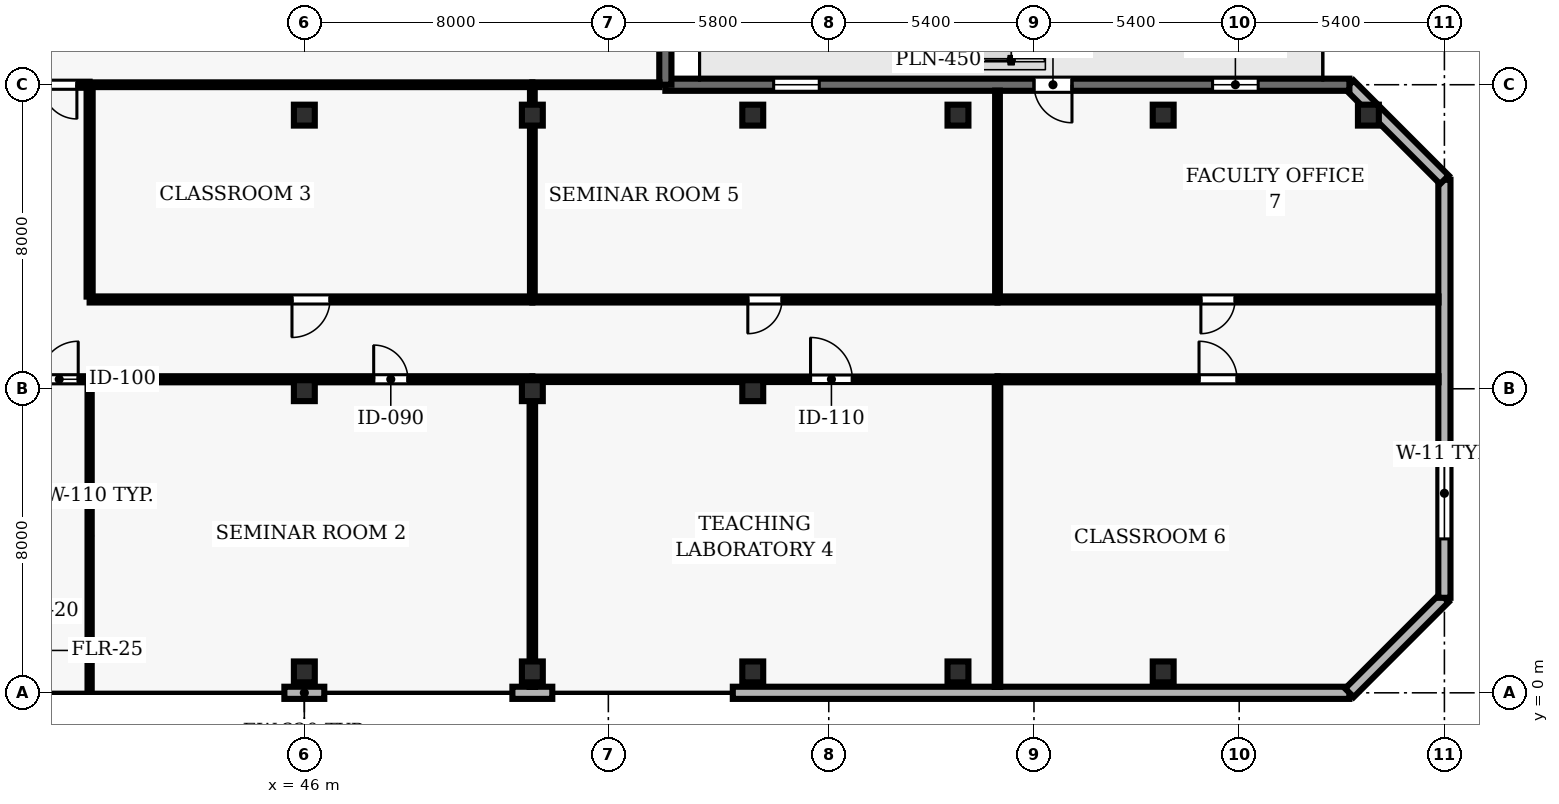
"""IFC4 building model, lengths in metres.
Left out: names, types, materials, properties, quantities, classifications, styles, units other than length and angle.
Written with IfcOpenShell. Run it as: python <this file> out.ifc"""

import sys

from ifc_helpers import new_model, si_unit, direction, frame, frame_2d, origin, origin_2d, place, context, subcontext, project, spatial, rectangle, hollow_rectangle, extrude, element, fill, save


model = new_model("IFC4")
c1 = context("Model", 3, precision=1e-05, world=origin(), true_north=direction((0.0, 1.0)))
c2 = subcontext(c1, "Body", "Model", "MODEL_VIEW")
j1 = project(units=[si_unit("LENGTHUNIT", "METRE"), si_unit("PLANEANGLEUNIT", "RADIAN")], contexts=[c1])
p1 = place(None, origin())
s1 = spatial("IfcSite", under=j1, at=p1, CompositionType="ELEMENT")
p2 = place(p1, origin())
s2 = spatial("IfcBuilding", under=s1, at=p2, CompositionType="ELEMENT")
p3 = place(p2, frame((0.0, 0.0, 38.8)))
s3 = spatial("IfcBuildingStorey", under=s2, at=p3, CompositionType="ELEMENT", Elevation=38.8)
for number, where, z_axis, x_axis in (
    (1, (46.0, 0.55, 0.0), (0.0, 0.0, 1.0), (1.0, 0.0, 0.0)),
    (2, (46.0, 7.95, 0.0), (0.0, 0.0, 1.0), (1.0, 0.0, 0.0)),
    (3, (46.0, 15.2, 0.0), (0.0, 0.0, 1.0), (1.0, 0.0, 0.0)),
    (4, (52.0, 0.55, 0.0), (0.0, 0.0, 1.0), (1.0, 0.0, 0.0)),
    (5, (52.0, 7.95, 0.0), (0.0, 0.0, 1.0), (1.0, 0.0, 0.0)),
    (6, (52.0, 15.2, 0.0), (0.0, 0.0, 1.0), (1.0, 0.0, 0.0)),
    (7, (57.8, 0.55, 0.0), (0.0, 0.0, 1.0), (1.0, 0.0, 0.0)),
    (8, (57.8, 7.95, 0.0), (0.0, 0.0, 1.0), (1.0, 0.0, 0.0)),
    (9, (57.8, 15.2, 0.0), (0.0, 0.0, 1.0), (1.0, 0.0, 0.0)),
    (10, (63.2, 0.55, 0.0), (0.0, 0.0, 1.0), (1.0, 0.0, 0.0)),
    (11, (63.2, 15.2, 0.0), (0.0, 0.0, 1.0), (1.0, 0.0, 0.0)),
    (12, (68.6, 0.55, 0.0), (0.0, 0.0, 1.0), (1.0, 0.0, 0.0)),
    (13, (68.6, 15.2, 0.0), (0.0, 0.0, 1.0), (1.0, 0.0, 0.0)),
    (14, (74.0, 15.2, 0.0), (0.0, 0.0, 1.0), (1.0, 0.0, 0.0)),
):
    element("IfcColumn", number, at=place(p3, frame(where, z_axis=z_axis, x_axis=x_axis)), inside=s3, PredefinedType="COLUMN", context=c2, shape_type="SweptSolid", body=[
        extrude(hollow_rectangle(XDim=0.55, YDim=0.55, WallThickness=0.025, at=origin_2d()), origin(), (0.0, 0.0, 1.0), 3.9),
    ])
for number, where, z_axis, x_axis in (
    (15, (45.475, 0.0, 0.0), (0.0, 0.0, 1.0), (1.0, 0.0, 0.0)),
    (16, (51.475, 0.0, 0.0), (0.0, 0.0, 1.0), (1.0, 0.0, 0.0)),
):
    element("IfcWall", number, at=place(p3, frame(where, z_axis=z_axis, x_axis=x_axis)), inside=s3, PredefinedType="SOLIDWALL", context=c2, shape_type="SweptSolid", body=[
        extrude(rectangle(XDim=1.05, YDim=0.32, at=frame_2d((0.525, 0.0))), origin(), (0.0, 0.0, 1.0), 3.69),
    ])
p4 = place(p3, frame((57.275, 0.0, 0.0), z_axis=(0.0, 0.0, 1.0), x_axis=(1.0, 0.0, 0.0)))
e17 = element("IfcWall", 17, at=p4, inside=s3, PredefinedType="SOLIDWALL", context=c2, shape_type="SweptSolid", body=[
    extrude(rectangle(XDim=16.225, YDim=0.32, at=frame_2d((8.113, 0.0))), origin(), (0.0, 0.0, 1.0), 3.69),
])
p5 = place(p3, frame((73.5, 0.0, 0.0), z_axis=(0.0, 0.0, 1.0), x_axis=(0.707106781187, 0.707106781187, 0.0)))
e18 = element("IfcWall", 18, at=p5, inside=s3, PredefinedType="SOLIDWALL", context=c2, shape_type="SweptSolid", body=[
    extrude(rectangle(XDim=3.536, YDim=0.32, at=frame_2d((1.768, 0.0))), origin(), (0.0, 0.0, 1.0), 3.69),
])
p6 = place(p3, frame((76.0, 2.5, 0.0), z_axis=(0.0, 0.0, 1.0), x_axis=(0.0, 1.0, 0.0)))
e19 = element("IfcWall", 19, at=p6, inside=s3, PredefinedType="SOLIDWALL", context=c2, shape_type="SweptSolid", body=[
    extrude(rectangle(XDim=11.0, YDim=0.32, at=frame_2d((5.5, 0.0))), origin(), (0.0, 0.0, 1.0), 3.69),
])
p7 = place(p6, frame((1.55, 0.0, 0.9)))
e20 = element("IfcOpeningElement", 20, at=p7, cuts=e19, PredefinedType="OPENING", context=c2, shape_type="SweptSolid", body=[
    extrude(rectangle(XDim=2.4, YDim=2.2, at=frame_2d((1.2, 1.1))), frame((0.0, 0.17, 0.0), z_axis=(0.0, -1.0, 0.0), x_axis=(1.0, 0.0, 0.0)), (0.0, 0.0, 1.0), 0.34),
])
p8 = place(p3, frame((76.0, 13.5, 0.0), z_axis=(0.0, 0.0, 1.0), x_axis=(-0.707106781187, 0.707106781187, 0.0)))
e21 = element("IfcWall", 21, at=p8, inside=s3, PredefinedType="SOLIDWALL", context=c2, shape_type="SweptSolid", body=[
    extrude(rectangle(XDim=3.536, YDim=0.32, at=frame_2d((1.768, 0.0))), origin(), (0.0, 0.0, 1.0), 3.69),
])
p9 = place(p3, frame((73.5, 16.0, 0.0), z_axis=(0.0, 0.0, 1.0), x_axis=(-1.0, 0.0, 0.0)))
e22 = element("IfcWall", 22, at=p9, inside=s3, PredefinedType="SOLIDWALL", context=c2, shape_type="SweptSolid", body=[
    extrude(rectangle(XDim=18.0, YDim=0.32, at=frame_2d((9.0, 0.0))), origin(), (0.0, 0.0, 1.0), 3.69),
])
p10 = place(p9, frame((7.3, 0.0, 0.0)))
e23 = element("IfcOpeningElement", 23, at=p10, cuts=e22, PredefinedType="OPENING", context=c2, shape_type="SweptSolid", body=[
    extrude(rectangle(XDim=1.0, YDim=2.2, at=frame_2d((0.5, 1.1))), frame((0.0, 0.17, 0.0), z_axis=(0.0, -1.0, 0.0), x_axis=(1.0, 0.0, 0.0)), (0.0, 0.0, 1.0), 0.34),
])
p11 = place(p9, frame((2.4, 0.0, 0.9)))
e24 = element("IfcOpeningElement", 24, at=p11, cuts=e22, PredefinedType="OPENING", context=c2, shape_type="SweptSolid", body=[
    extrude(rectangle(XDim=1.2, YDim=1.6, at=frame_2d((0.6, 0.8))), frame((0.0, 0.17, 0.0), z_axis=(0.0, -1.0, 0.0), x_axis=(1.0, 0.0, 0.0)), (0.0, 0.0, 1.0), 0.34),
])
p12 = place(p9, frame((13.95, 0.0, 0.9)))
e25 = element("IfcOpeningElement", 25, at=p12, cuts=e22, PredefinedType="OPENING", context=c2, shape_type="SweptSolid", body=[
    extrude(rectangle(XDim=1.2, YDim=1.6, at=frame_2d((0.6, 0.8))), frame((0.0, 0.17, 0.0), z_axis=(0.0, -1.0, 0.0), x_axis=(1.0, 0.0, 0.0)), (0.0, 0.0, 1.0), 0.34),
])
p13 = place(p3, frame((55.5, 16.0, 0.0), z_axis=(0.0, 0.0, 1.0), x_axis=(0.0, 1.0, 0.0)))
e26 = element("IfcWall", 26, at=p13, inside=s3, PredefinedType="SOLIDWALL", context=c2, shape_type="SweptSolid", body=[
    extrude(rectangle(XDim=11.4, YDim=0.32, at=frame_2d((5.7, 0.0))), origin(), (0.0, 0.0, 1.0), 3.69),
])
p14 = place(p13, frame((2.1, 0.0, 0.9)))
e27 = element("IfcOpeningElement", 27, at=p14, cuts=e26, PredefinedType="OPENING", context=c2, shape_type="SweptSolid", body=[
    extrude(rectangle(XDim=1.5, YDim=1.6, at=frame_2d((0.75, 0.8))), frame((0.0, 0.17, 0.0), z_axis=(0.0, -1.0, 0.0), x_axis=(1.0, 0.0, 0.0)), (0.0, 0.0, 1.0), 0.34),
])
p15 = place(p13, frame((7.8, 0.0, 0.9)))
e28 = element("IfcOpeningElement", 28, at=p15, cuts=e26, PredefinedType="OPENING", context=c2, shape_type="SweptSolid", body=[
    extrude(rectangle(XDim=1.5, YDim=1.6, at=frame_2d((0.75, 0.8))), frame((0.0, 0.17, 0.0), z_axis=(0.0, -1.0, 0.0), x_axis=(1.0, 0.0, 0.0)), (0.0, 0.0, 1.0), 0.34),
])
p16 = place(p3, frame((38.05, 8.25, 0.0), z_axis=(0.0, 0.0, 1.0), x_axis=(1.0, 0.0, 0.0)))
e29 = element("IfcWall", 29, at=p16, inside=s3, PredefinedType="PARTITIONING", context=c2, shape_type="SweptSolid", body=[
    extrude(rectangle(XDim=2.3, YDim=0.16, at=frame_2d((1.15, 0.0))), origin(), (0.0, 0.0, 1.0), 2.995),
])
p17 = place(p16, frame((1.0, 0.0, 0.0)))
e30 = element("IfcOpeningElement", 30, at=p17, cuts=e29, PredefinedType="OPENING", context=c2, shape_type="SweptSolid", body=[
    extrude(rectangle(XDim=1.0, YDim=2.1, at=frame_2d((0.5, 1.05))), frame((0.0, 0.09, 0.0), z_axis=(0.0, -1.0, 0.0), x_axis=(1.0, 0.0, 0.0)), (0.0, 0.0, 1.0), 0.18),
])
p18 = place(p3, frame((40.35, 8.25, 0.0), z_axis=(0.0, 0.0, 1.0), x_axis=(1.0, 0.0, 0.0)))
e31 = element("IfcWall", 31, at=p18, inside=s3, PredefinedType="PARTITIONING", context=c2, shape_type="SweptSolid", body=[
    extrude(rectangle(XDim=11.65, YDim=0.16, at=frame_2d((5.825, 0.0))), origin(), (0.0, 0.0, 1.0), 2.995),
])
p19 = place(p18, frame((7.475, 0.0, 0.0)))
e32 = element("IfcOpeningElement", 32, at=p19, cuts=e31, PredefinedType="OPENING", context=c2, shape_type="SweptSolid", body=[
    extrude(rectangle(XDim=0.9, YDim=2.1, at=frame_2d((0.45, 1.05))), frame((0.0, 0.09, 0.0), z_axis=(0.0, -1.0, 0.0), x_axis=(1.0, 0.0, 0.0)), (0.0, 0.0, 1.0), 0.18),
])
p20 = place(p3, frame((40.35, 16.0, 0.0), z_axis=(0.0, 0.0, 1.0), x_axis=(-1.0, 0.0, 0.0)))
e33 = element("IfcWall", 33, at=p20, inside=s3, PredefinedType="PARTITIONING", context=c2, shape_type="SweptSolid", body=[
    extrude(rectangle(XDim=2.27, YDim=0.16, at=frame_2d((1.135, 0.0))), origin(), (0.0, 0.0, 1.0), 3.69),
])
p21 = place(p20, frame((0.335, 0.0, 0.0)))
e34 = element("IfcOpeningElement", 34, at=p21, cuts=e33, PredefinedType="OPENING", context=c2, shape_type="SweptSolid", body=[
    extrude(rectangle(XDim=0.9, YDim=2.1, at=frame_2d((0.45, 1.05))), frame((0.0, 0.09, 0.0), z_axis=(0.0, -1.0, 0.0), x_axis=(1.0, 0.0, 0.0)), (0.0, 0.0, 1.0), 0.18),
])
p22 = place(p3, frame((52.0, 8.25, 0.0), z_axis=(0.0, 0.0, 1.0), x_axis=(1.0, 0.0, 0.0)))
e35 = element("IfcWall", 35, at=p22, inside=s3, PredefinedType="PARTITIONING", context=c2, shape_type="SweptSolid", body=[
    extrude(rectangle(XDim=12.24, YDim=0.145, at=frame_2d((6.12, 0.0))), origin(), (0.0, 0.0, 1.0), 2.995),
])
p23 = place(p22, frame((7.32, 0.0, 0.0)))
e36 = element("IfcOpeningElement", 36, at=p23, cuts=e35, PredefinedType="OPENING", context=c2, shape_type="SweptSolid", body=[
    extrude(rectangle(XDim=1.1, YDim=2.15, at=frame_2d((0.55, 1.075))), frame((0.0, 0.083, 0.0), z_axis=(0.0, -1.0, 0.0), x_axis=(1.0, 0.0, 0.0)), (0.0, 0.0, 1.0), 0.165),
])
p24 = place(p3, frame((52.0, 10.35, 0.0), z_axis=(0.0, 0.0, 1.0), x_axis=(-1.0, 0.0, 0.0)))
e37 = element("IfcWall", 37, at=p24, inside=s3, PredefinedType="PARTITIONING", context=c2, shape_type="SweptSolid", body=[
    extrude(rectangle(XDim=11.65, YDim=0.16, at=frame_2d((5.825, 0.0))), origin(), (0.0, 0.0, 1.0), 3.227),
])
p25 = place(p24, frame((5.325, 0.0, 0.0)))
e38 = element("IfcOpeningElement", 38, at=p25, cuts=e37, PredefinedType="OPENING", context=c2, shape_type="SweptSolid", body=[
    extrude(rectangle(XDim=1.0, YDim=2.1, at=frame_2d((0.5, 1.05))), frame((0.0, 0.09, 0.0), z_axis=(0.0, -1.0, 0.0), x_axis=(1.0, 0.0, 0.0)), (0.0, 0.0, 1.0), 0.18),
])
p26 = place(p3, frame((52.0, 16.0, 0.0), z_axis=(0.0, 0.0, 1.0), x_axis=(1.0, 0.0, 0.0)))
e39 = element("IfcWall", 39, at=p26, inside=s3, PredefinedType="PARTITIONING", context=c2, shape_type="SweptSolid", body=[
    extrude(rectangle(XDim=3.345, YDim=0.125, at=frame_2d((1.672, 0.0))), origin(), (0.0, 0.0, 1.0), 3.39),
])
p27 = place(p3, frame((52.0, 16.0, 0.0), z_axis=(0.0, 0.0, 1.0), x_axis=(-1.0, 0.0, 0.0)))
e40 = element("IfcWall", 40, at=p27, inside=s3, PredefinedType="PARTITIONING", context=c2, shape_type="SweptSolid", body=[
    extrude(rectangle(XDim=11.65, YDim=0.125, at=frame_2d((5.825, 0.0))), origin(), (0.0, 0.0, 1.0), 3.69),
])
p28 = place(p3, frame((64.24, 8.25, 0.0), z_axis=(0.0, 0.0, 1.0), x_axis=(1.0, 0.0, 0.0)))
e41 = element("IfcWall", 41, at=p28, inside=s3, PredefinedType="PARTITIONING", context=c2, shape_type="SweptSolid", body=[
    extrude(rectangle(XDim=11.605, YDim=0.16, at=frame_2d((5.802, 0.0))), origin(), (0.0, 0.0, 1.0), 3.69),
])
p29 = place(p28, frame((5.303, 0.0, 0.0)))
e42 = element("IfcOpeningElement", 42, at=p29, cuts=e41, PredefinedType="OPENING", context=c2, shape_type="SweptSolid", body=[
    extrude(rectangle(XDim=1.0, YDim=2.1, at=frame_2d((0.5, 1.05))), frame((0.0, 0.09, 0.0), z_axis=(0.0, -1.0, 0.0), x_axis=(1.0, 0.0, 0.0)), (0.0, 0.0, 1.0), 0.18),
])
p30 = place(p3, frame((64.24, 10.35, 0.0), z_axis=(0.0, 0.0, 1.0), x_axis=(-1.0, 0.0, 0.0)))
e43 = element("IfcWall", 43, at=p30, inside=s3, PredefinedType="PARTITIONING", context=c2, shape_type="SweptSolid", body=[
    extrude(rectangle(XDim=12.24, YDim=0.16, at=frame_2d((6.12, 0.0))), origin(), (0.0, 0.0, 1.0), 3.227),
])
p31 = place(p30, frame((5.67, 0.0, 0.0)))
e44 = element("IfcOpeningElement", 44, at=p31, cuts=e43, PredefinedType="OPENING", context=c2, shape_type="SweptSolid", body=[
    extrude(rectangle(XDim=0.9, YDim=2.1, at=frame_2d((0.45, 1.05))), frame((0.0, 0.09, 0.0), z_axis=(0.0, -1.0, 0.0), x_axis=(1.0, 0.0, 0.0)), (0.0, 0.0, 1.0), 0.18),
])
p32 = place(p3, frame((75.845, 10.35, 0.0), z_axis=(0.0, 0.0, 1.0), x_axis=(-1.0, 0.0, 0.0)))
e45 = element("IfcWall", 45, at=p32, inside=s3, PredefinedType="PARTITIONING", context=c2, shape_type="SweptSolid", body=[
    extrude(rectangle(XDim=11.605, YDim=0.16, at=frame_2d((5.802, 0.0))), origin(), (0.0, 0.0, 1.0), 3.227),
])
p33 = place(p32, frame((5.353, 0.0, 0.0)))
e46 = element("IfcOpeningElement", 46, at=p33, cuts=e45, PredefinedType="OPENING", context=c2, shape_type="SweptSolid", body=[
    extrude(rectangle(XDim=0.9, YDim=2.1, at=frame_2d((0.45, 1.05))), frame((0.0, 0.09, 0.0), z_axis=(0.0, -1.0, 0.0), x_axis=(1.0, 0.0, 0.0)), (0.0, 0.0, 1.0), 0.18),
])
p34 = place(p3, frame((40.35, 0.09, 0.0), z_axis=(0.0, 0.0, 1.0), x_axis=(0.0, 1.0, 0.0)))
e47 = element("IfcWall", 47, at=p34, inside=s3, PredefinedType="MOVABLE", context=c2, shape_type="SweptSolid", body=[
    extrude(rectangle(XDim=8.085, YDim=0.11, at=frame_2d((4.042, 0.0))), origin(), (0.0, 0.0, 1.0), 3.69),
])
p35 = place(p3, frame((40.35, 10.425, 0.0), z_axis=(0.0, 0.0, 1.0), x_axis=(0.0, 1.0, 0.0)))
e48 = element("IfcWall", 48, at=p35, inside=s3, PredefinedType="PARTITIONING", context=c2, shape_type="SweptSolid", body=[
    extrude(rectangle(XDim=5.5, YDim=0.16, at=frame_2d((2.75, 0.0))), origin(), (0.0, 0.0, 1.0), 3.227),
])
p36 = place(p3, frame((52.0, 0.155, 0.0), z_axis=(0.0, 0.0, 1.0), x_axis=(0.0, 1.0, 0.0)))
e49 = element("IfcWall", 49, at=p36, inside=s3, PredefinedType="PARTITIONING", context=c2, shape_type="SweptSolid", body=[
    extrude(rectangle(XDim=8.02, YDim=0.145, at=frame_2d((4.01, 0.0))), origin(), (0.0, 0.0, 1.0), 2.995),
])
p37 = place(p3, frame((52.0, 10.425, 0.0), z_axis=(0.0, 0.0, 1.0), x_axis=(0.0, 1.0, 0.0)))
e50 = element("IfcWall", 50, at=p37, inside=s3, PredefinedType="PARTITIONING", context=c2, shape_type="SweptSolid", body=[
    extrude(rectangle(XDim=5.518, YDim=0.125, at=frame_2d((2.759, 0.0))), origin(), (0.0, 0.0, 1.0), 2.995),
])
p38 = place(p3, frame((64.24, 0.155, 0.0), z_axis=(0.0, 0.0, 1.0), x_axis=(0.0, 1.0, 0.0)))
e51 = element("IfcWall", 51, at=p38, inside=s3, PredefinedType="PARTITIONING", context=c2, shape_type="SweptSolid", body=[
    extrude(rectangle(XDim=8.02, YDim=0.145, at=frame_2d((4.01, 0.0))), origin(), (0.0, 0.0, 1.0), 3.69),
])
p39 = place(p3, frame((64.24, 10.425, 0.0), z_axis=(0.0, 0.0, 1.0), x_axis=(0.0, 1.0, 0.0)))
e52 = element("IfcWall", 52, at=p39, inside=s3, PredefinedType="PARTITIONING", context=c2, shape_type="SweptSolid", body=[
    extrude(rectangle(XDim=5.42, YDim=0.125, at=frame_2d((2.71, 0.0))), origin(), (0.0, 0.0, 1.0), 3.69),
])
p40 = place(p7, origin())
e53 = element("IfcWindow", 53, at=p40, inside=s3, PartitioningType="SINGLE_PANEL", PredefinedType="WINDOW", context=c2, shape_type="SweptSolid", body=[
    extrude(rectangle(XDim=2.4, YDim=2.2, at=frame_2d((1.2, 1.1))), frame((0.0, 0.03, 0.0), z_axis=(0.0, -1.0, 0.0), x_axis=(1.0, 0.0, 0.0)), (0.0, 0.0, 1.0), 0.06),
])
fill(e20, e53)
p41 = place(p10, origin())
e54 = element("IfcDoor", 54, at=p41, inside=s3, OperationType="SINGLE_SWING_LEFT", PredefinedType="DOOR", context=c2, shape_type="SweptSolid", body=[
    extrude(rectangle(XDim=1.0, YDim=2.2, at=frame_2d((0.5, 1.1))), frame((0.0, 0.025, 0.0), z_axis=(0.0, -1.0, 0.0), x_axis=(1.0, 0.0, 0.0)), (0.0, 0.0, 1.0), 0.05),
])
fill(e23, e54)
p42 = place(p11, origin())
e55 = element("IfcWindow", 55, at=p42, inside=s3, PartitioningType="SINGLE_PANEL", PredefinedType="WINDOW", context=c2, shape_type="SweptSolid", body=[
    extrude(rectangle(XDim=1.2, YDim=1.6, at=frame_2d((0.6, 0.8))), frame((0.0, 0.03, 0.0), z_axis=(0.0, -1.0, 0.0), x_axis=(1.0, 0.0, 0.0)), (0.0, 0.0, 1.0), 0.06),
])
fill(e24, e55)
p43 = place(p12, origin())
e56 = element("IfcWindow", 56, at=p43, inside=s3, PartitioningType="SINGLE_PANEL", PredefinedType="WINDOW", context=c2, shape_type="SweptSolid", body=[
    extrude(rectangle(XDim=1.2, YDim=1.6, at=frame_2d((0.6, 0.8))), frame((0.0, 0.03, 0.0), z_axis=(0.0, -1.0, 0.0), x_axis=(1.0, 0.0, 0.0)), (0.0, 0.0, 1.0), 0.06),
])
fill(e25, e56)
p44 = place(p17, origin())
e57 = element("IfcDoor", 57, at=p44, inside=s3, OperationType="SINGLE_SWING_RIGHT", PredefinedType="DOOR", context=c2, shape_type="SweptSolid", body=[
    extrude(rectangle(XDim=1.0, YDim=2.1, at=frame_2d((0.5, 1.05))), frame((0.0, 0.025, 0.0), z_axis=(0.0, -1.0, 0.0), x_axis=(1.0, 0.0, 0.0)), (0.0, 0.0, 1.0), 0.05),
])
fill(e30, e57)
p45 = place(p19, origin())
e58 = element("IfcDoor", 58, at=p45, inside=s3, OperationType="SINGLE_SWING_LEFT", PredefinedType="DOOR", context=c2, shape_type="SweptSolid", body=[
    extrude(rectangle(XDim=0.9, YDim=2.1, at=frame_2d((0.45, 1.05))), frame((0.0, 0.025, 0.0), z_axis=(0.0, -1.0, 0.0), x_axis=(1.0, 0.0, 0.0)), (0.0, 0.0, 1.0), 0.05),
])
fill(e32, e58)
p46 = place(p25, origin())
e59 = element("IfcDoor", 59, at=p46, inside=s3, OperationType="SINGLE_SWING_RIGHT", PredefinedType="DOOR", context=c2, shape_type="SweptSolid", body=[
    extrude(rectangle(XDim=1.0, YDim=2.1, at=frame_2d((0.5, 1.05))), frame((0.0, 0.025, 0.0), z_axis=(0.0, -1.0, 0.0), x_axis=(1.0, 0.0, 0.0)), (0.0, 0.0, 1.0), 0.05),
])
fill(e38, e59)
p47 = place(p23, origin())
e60 = element("IfcDoor", 60, at=p47, inside=s3, OperationType="SINGLE_SWING_LEFT", PredefinedType="DOOR", context=c2, shape_type="SweptSolid", body=[
    extrude(rectangle(XDim=1.1, YDim=2.15, at=frame_2d((0.55, 1.075))), frame((0.0, 0.025, 0.0), z_axis=(0.0, -1.0, 0.0), x_axis=(1.0, 0.0, 0.0)), (0.0, 0.0, 1.0), 0.05),
])
fill(e36, e60)
p48 = place(p31, origin())
e61 = element("IfcDoor", 61, at=p48, inside=s3, OperationType="SINGLE_SWING_RIGHT", PredefinedType="DOOR", context=c2, shape_type="SweptSolid", body=[
    extrude(rectangle(XDim=0.9, YDim=2.1, at=frame_2d((0.45, 1.05))), frame((0.0, 0.025, 0.0), z_axis=(0.0, -1.0, 0.0), x_axis=(1.0, 0.0, 0.0)), (0.0, 0.0, 1.0), 0.05),
])
fill(e44, e61)
p49 = place(p29, origin())
e62 = element("IfcDoor", 62, at=p49, inside=s3, OperationType="SINGLE_SWING_LEFT", PredefinedType="DOOR", context=c2, shape_type="SweptSolid", body=[
    extrude(rectangle(XDim=1.0, YDim=2.1, at=frame_2d((0.5, 1.05))), frame((0.0, 0.025, 0.0), z_axis=(0.0, -1.0, 0.0), x_axis=(1.0, 0.0, 0.0)), (0.0, 0.0, 1.0), 0.05),
])
fill(e42, e62)
p50 = place(p33, origin())
e63 = element("IfcDoor", 63, at=p50, inside=s3, OperationType="SINGLE_SWING_RIGHT", PredefinedType="DOOR", context=c2, shape_type="SweptSolid", body=[
    extrude(rectangle(XDim=0.9, YDim=2.1, at=frame_2d((0.45, 1.05))), frame((0.0, 0.025, 0.0), z_axis=(0.0, -1.0, 0.0), x_axis=(1.0, 0.0, 0.0)), (0.0, 0.0, 1.0), 0.05),
])
fill(e46, e63)
p51 = place(p21, origin())
e64 = element("IfcDoor", 64, at=p51, inside=s3, OperationType="SINGLE_SWING_LEFT", PredefinedType="DOOR", context=c2, shape_type="SweptSolid", body=[
    extrude(rectangle(XDim=0.9, YDim=2.1, at=frame_2d((0.45, 1.05))), frame((0.0, 0.025, 0.0), z_axis=(0.0, -1.0, 0.0), x_axis=(1.0, 0.0, 0.0)), (0.0, 0.0, 1.0), 0.05),
])
fill(e34, e64)
save(model, sys.argv[1])
